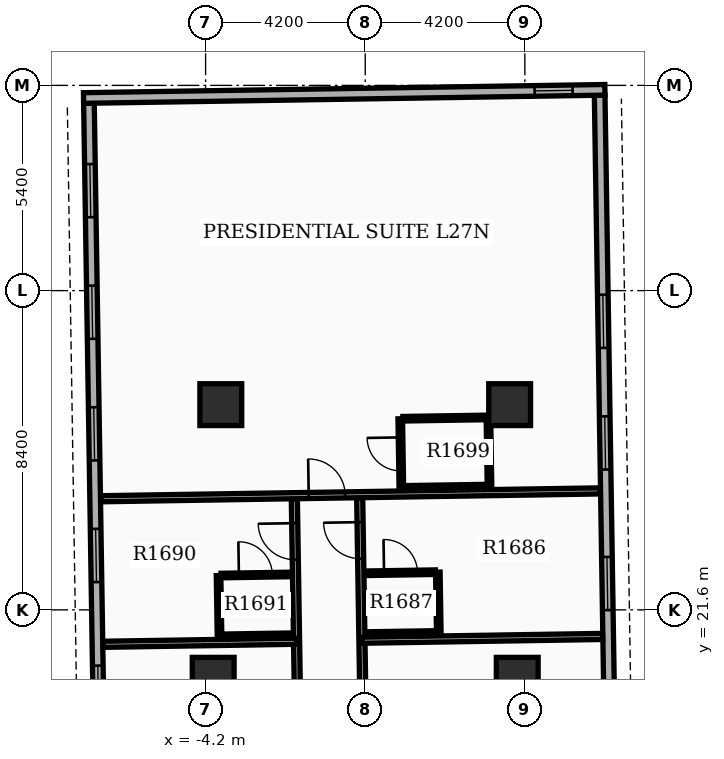
"""IFC4 building model, lengths in metres.
Left out: names, types, materials, properties, quantities, classifications, styles, units other than length and angle.
Written with IfcOpenShell. Run it as: python <this file> out.ifc"""

import sys

from ifc_helpers import new_model, si_unit, direction, frame, frame_2d, origin, origin_2d, place, context, subcontext, project, spatial, rectangle, extrude, element, fill, save


model = new_model("IFC4")
c1 = context("Model", 3, precision=1e-05, world=origin(), true_north=direction((0.0, 1.0)))
c2 = subcontext(c1, "Body", "Model", "MODEL_VIEW")
j1 = project(units=[si_unit("LENGTHUNIT", "METRE"), si_unit("PLANEANGLEUNIT", "RADIAN")], contexts=[c1])
p1 = place(None, origin())
s1 = spatial("IfcSite", under=j1, at=p1, CompositionType="ELEMENT")
p2 = place(p1, origin())
s2 = spatial("IfcBuilding", under=s1, at=p2, CompositionType="ELEMENT")
p3 = place(p2, frame((0.0, 0.0, 108.6)))
s3 = spatial("IfcBuildingStorey", under=s2, at=p3, CompositionType="ELEMENT", Elevation=108.6)
for number, where, z_axis, x_axis in (
    (1, (-4.0, 19.8, 0.0), (0.0, 0.0, 1.0), (1.0, 0.0, 0.0)),
    (2, (4.0, 19.8, 0.0), (0.0, 0.0, 1.0), (1.0, 0.0, 0.0)),
    (3, (-3.8, 27.0, 0.0), (0.0, 0.0, 1.0), (1.0, 0.0, 0.0)),
    (4, (3.8, 27.0, 0.0), (0.0, 0.0, 1.0), (1.0, 0.0, 0.0)),
):
    element("IfcColumn", number, at=place(p3, frame(where, z_axis=z_axis, x_axis=x_axis)), inside=s3, PredefinedType="COLUMN", context=c2, shape_type="SweptSolid", body=[
        extrude(rectangle(XDim=1.1, YDim=1.1, at=origin_2d()), origin(), (0.0, 0.0, 1.0), 3.9),
    ])
p4 = place(p3, frame((6.485, 15.044, 0.0), z_axis=(0.0, 0.0, 1.0), x_axis=(-0.01571739401, 0.999876474133, 0.0)))
e5 = element("IfcWall", 5, at=p4, inside=s3, PredefinedType="STANDARD", context=c2, shape_type="SweptSolid", body=[
    extrude(rectangle(XDim=20.1, YDim=0.28, at=frame_2d((10.05, 0.0))), origin(), (0.0, 0.0, 1.0), 2.97),
])
p5 = place(p4, frame((1.6, 0.0, 0.8)))
e6 = element("IfcOpeningElement", 6, at=p5, cuts=e5, PredefinedType="OPENING", context=c2, shape_type="SweptSolid", body=[
    extrude(rectangle(XDim=1.4, YDim=1.6, at=frame_2d((0.7, 0.8))), frame((0.0, 0.15, 0.0), z_axis=(0.0, -1.0, 0.0), x_axis=(1.0, 0.0, 0.0)), (0.0, 0.0, 1.0), 0.3),
])
p6 = place(p4, frame((6.55, 0.0, 0.8)))
e7 = element("IfcOpeningElement", 7, at=p6, cuts=e5, PredefinedType="OPENING", context=c2, shape_type="SweptSolid", body=[
    extrude(rectangle(XDim=1.4, YDim=1.6, at=frame_2d((0.7, 0.8))), frame((0.0, 0.15, 0.0), z_axis=(0.0, -1.0, 0.0), x_axis=(1.0, 0.0, 0.0)), (0.0, 0.0, 1.0), 0.3),
])
p7 = place(p4, frame((10.25, 0.0, 0.8)))
e8 = element("IfcOpeningElement", 8, at=p7, cuts=e5, PredefinedType="OPENING", context=c2, shape_type="SweptSolid", body=[
    extrude(rectangle(XDim=1.4, YDim=1.6, at=frame_2d((0.7, 0.8))), frame((0.0, 0.15, 0.0), z_axis=(0.0, -1.0, 0.0), x_axis=(1.0, 0.0, 0.0)), (0.0, 0.0, 1.0), 0.3),
])
p8 = place(p4, frame((13.45, 0.0, 0.8)))
e9 = element("IfcOpeningElement", 9, at=p8, cuts=e5, PredefinedType="OPENING", context=c2, shape_type="SweptSolid", body=[
    extrude(rectangle(XDim=1.4, YDim=1.6, at=frame_2d((0.7, 0.8))), frame((0.0, 0.15, 0.0), z_axis=(0.0, -1.0, 0.0), x_axis=(1.0, 0.0, 0.0)), (0.0, 0.0, 1.0), 0.3),
])
p9 = place(p3, frame((-7.27, 34.93, 0.0), z_axis=(0.0, 0.0, 1.0), x_axis=(0.015705059908, -0.999876667941, 0.0)))
e10 = element("IfcWall", 10, at=p9, inside=s3, PredefinedType="STANDARD", context=c2, shape_type="SweptSolid", body=[
    extrude(rectangle(XDim=20.1, YDim=0.28, at=frame_2d((10.05, 0.0))), origin(), (0.0, 0.0, 1.0), 2.97),
])
p10 = place(p9, frame((1.6, 0.0, 0.8)))
e11 = element("IfcOpeningElement", 11, at=p10, cuts=e10, PredefinedType="OPENING", context=c2, shape_type="SweptSolid", body=[
    extrude(rectangle(XDim=1.4, YDim=1.6, at=frame_2d((0.7, 0.8))), frame((0.0, 0.15, 0.0), z_axis=(0.0, -1.0, 0.0), x_axis=(1.0, 0.0, 0.0)), (0.0, 0.0, 1.0), 0.3),
])
p11 = place(p9, frame((4.8, 0.0, 0.8)))
e12 = element("IfcOpeningElement", 12, at=p11, cuts=e10, PredefinedType="OPENING", context=c2, shape_type="SweptSolid", body=[
    extrude(rectangle(XDim=1.4, YDim=1.6, at=frame_2d((0.7, 0.8))), frame((0.0, 0.15, 0.0), z_axis=(0.0, -1.0, 0.0), x_axis=(1.0, 0.0, 0.0)), (0.0, 0.0, 1.0), 0.3),
])
p12 = place(p9, frame((8.0, 0.0, 0.8)))
e13 = element("IfcOpeningElement", 13, at=p12, cuts=e10, PredefinedType="OPENING", context=c2, shape_type="SweptSolid", body=[
    extrude(rectangle(XDim=1.4, YDim=1.6, at=frame_2d((0.7, 0.8))), frame((0.0, 0.15, 0.0), z_axis=(0.0, -1.0, 0.0), x_axis=(1.0, 0.0, 0.0)), (0.0, 0.0, 1.0), 0.3),
])
p13 = place(p9, frame((11.2, 0.0, 0.8)))
e14 = element("IfcOpeningElement", 14, at=p13, cuts=e10, PredefinedType="OPENING", context=c2, shape_type="SweptSolid", body=[
    extrude(rectangle(XDim=1.4, YDim=1.6, at=frame_2d((0.7, 0.8))), frame((0.0, 0.15, 0.0), z_axis=(0.0, -1.0, 0.0), x_axis=(1.0, 0.0, 0.0)), (0.0, 0.0, 1.0), 0.3),
])
p14 = place(p9, frame((14.799, 0.0, 0.85)))
e15 = element("IfcOpeningElement", 15, at=p14, cuts=e10, PredefinedType="OPENING", context=c2, shape_type="SweptSolid", body=[
    extrude(rectangle(XDim=1.2, YDim=1.6, at=frame_2d((0.6, 0.8))), frame((0.0, 0.15, 0.0), z_axis=(0.0, -1.0, 0.0), x_axis=(1.0, 0.0, 0.0)), (0.0, 0.0, 1.0), 0.3),
])
p15 = place(p3, frame((6.307, 35.283, 0.0), z_axis=(0.0, 0.0, 1.0), x_axis=(-0.999876549481, -0.015712599986, 0.0)))
e16 = element("IfcWall", 16, at=p15, inside=s3, PredefinedType="STANDARD", context=c2, shape_type="SweptSolid", body=[
    extrude(rectangle(XDim=13.72, YDim=0.28, at=frame_2d((6.86, 0.0))), origin(), (0.0, 0.0, 1.0), 2.97),
])
p16 = place(p15, frame((0.85, 0.0, 0.85)))
e17 = element("IfcOpeningElement", 17, at=p16, cuts=e16, PredefinedType="OPENING", context=c2, shape_type="SweptSolid", body=[
    extrude(rectangle(XDim=1.0, YDim=1.5, at=frame_2d((0.5, 0.75))), frame((0.0, 0.15, 0.0), z_axis=(0.0, -1.0, 0.0), x_axis=(1.0, 0.0, 0.0)), (0.0, 0.0, 1.0), 0.3),
])
p17 = place(p3, frame((0.007, 14.852, 0.0), z_axis=(0.0, 0.0, 1.0), x_axis=(-0.015680101899, 0.999877059645, 0.0)))
e18 = element("IfcWall", 18, at=p17, inside=s3, PredefinedType="PARTITIONING", context=c2, shape_type="SweptSolid", body=[
    extrude(rectangle(XDim=9.7, YDim=0.16, at=frame_2d((4.85, 0.0))), origin(), (0.0, 0.0, 1.0), 2.96),
])
p18 = place(p17, frame((2.575, 0.0, 0.0)))
e19 = element("IfcOpeningElement", 19, at=p18, cuts=e18, PredefinedType="OPENING", context=c2, shape_type="SweptSolid", body=[
    extrude(rectangle(XDim=0.96, YDim=2.15, at=frame_2d((0.48, 1.075))), frame((0.0, 0.09, 0.0), z_axis=(0.0, -1.0, 0.0), x_axis=(1.0, 0.0, 0.0)), (0.0, 0.0, 1.0), 0.18),
])
p19 = place(p17, frame((8.097, 0.0, 0.0)))
e20 = element("IfcOpeningElement", 20, at=p19, cuts=e18, PredefinedType="OPENING", context=c2, shape_type="SweptSolid", body=[
    extrude(rectangle(XDim=0.96, YDim=2.15, at=frame_2d((0.48, 1.075))), frame((0.0, 0.09, 0.0), z_axis=(0.0, -1.0, 0.0), x_axis=(1.0, 0.0, 0.0)), (0.0, 0.0, 1.0), 0.18),
])
p20 = place(p3, frame((-0.087, 20.801, 0.0), z_axis=(0.0, 0.0, 1.0), x_axis=(0.999876857896, 0.015692961637, 0.0)))
e21 = element("IfcWall", 21, at=p20, inside=s3, PredefinedType="PARTITIONING", context=c2, shape_type="SweptSolid", body=[
    extrude(rectangle(XDim=6.332, YDim=0.16, at=frame_2d((3.166, 0.0))), origin(), (0.0, 0.0, 1.0), 2.96),
])
p21 = place(p3, frame((0.026, 22.563, 0.0), z_axis=(0.0, 0.0, 1.0), x_axis=(0.999876836305, 0.015694337248, 0.0)))
e22 = element("IfcWall", 22, at=p21, inside=s3, PredefinedType="PARTITIONING", context=c2, shape_type="SweptSolid", body=[
    extrude(rectangle(XDim=1.82, YDim=0.12, at=frame_2d((0.91, 0.0))), origin(), (0.0, 0.0, 1.0), 2.96),
])
p22 = place(p21, frame((0.47, 0.0, 0.0)))
e23 = element("IfcOpeningElement", 23, at=p22, cuts=e22, PredefinedType="OPENING", context=c2, shape_type="SweptSolid", body=[
    extrude(rectangle(XDim=0.88, YDim=2.1, at=frame_2d((0.44, 1.05))), frame((0.0, 0.07, 0.0), z_axis=(0.0, -1.0, 0.0), x_axis=(1.0, 0.0, 0.0)), (0.0, 0.0, 1.0), 0.14),
])
p23 = place(p3, frame((0.051, 20.963, 0.0), z_axis=(0.0, 0.0, 1.0), x_axis=(0.999876836305, 0.015694337248, 0.0)))
e24 = element("IfcWall", 24, at=p23, inside=s3, PredefinedType="PARTITIONING", context=c2, shape_type="SweptSolid", body=[
    extrude(rectangle(XDim=1.82, YDim=0.12, at=frame_2d((0.91, 0.0))), origin(), (0.0, 0.0, 1.0), 2.96),
])
p24 = place(p3, frame((1.936, 20.993, 0.0), z_axis=(0.0, 0.0, 1.0), x_axis=(-0.015716050513, 0.999876495251, 0.0)))
e25 = element("IfcWall", 25, at=p24, inside=s3, PredefinedType="PARTITIONING", context=c2, shape_type="SweptSolid", body=[
    extrude(rectangle(XDim=1.6, YDim=0.12, at=frame_2d((0.8, 0.0))), origin(), (0.0, 0.0, 1.0), 2.96),
])
p25 = place(p3, frame((-1.713, 14.825, 0.0), z_axis=(0.0, 0.0, 1.0), x_axis=(-0.015705659641, 0.999876658521, 0.0)))
e26 = element("IfcWall", 26, at=p25, inside=s3, PredefinedType="PARTITIONING", context=c2, shape_type="SweptSolid", body=[
    extrude(rectangle(XDim=9.7, YDim=0.16, at=frame_2d((4.85, 0.0))), origin(), (0.0, 0.0, 1.0), 2.96),
])
p26 = place(p25, frame((2.575, 0.0, 0.0)))
e27 = element("IfcOpeningElement", 27, at=p26, cuts=e26, PredefinedType="OPENING", context=c2, shape_type="SweptSolid", body=[
    extrude(rectangle(XDim=0.96, YDim=2.15, at=frame_2d((0.48, 1.075))), frame((0.0, 0.09, 0.0), z_axis=(0.0, -1.0, 0.0), x_axis=(1.0, 0.0, 0.0)), (0.0, 0.0, 1.0), 0.18),
])
p27 = place(p25, frame((8.097, 0.0, 0.0)))
e28 = element("IfcOpeningElement", 28, at=p27, cuts=e26, PredefinedType="OPENING", context=c2, shape_type="SweptSolid", body=[
    extrude(rectangle(XDim=0.96, YDim=2.15, at=frame_2d((0.48, 1.075))), frame((0.0, 0.09, 0.0), z_axis=(0.0, -1.0, 0.0), x_axis=(1.0, 0.0, 0.0)), (0.0, 0.0, 1.0), 0.18),
])
p28 = place(p3, frame((-1.806, 20.774, 0.0), z_axis=(0.0, 0.0, 1.0), x_axis=(-0.999876343559, -0.015725698427, 0.0)))
e29 = element("IfcWall", 29, at=p28, inside=s3, PredefinedType="PARTITIONING", context=c2, shape_type="SweptSolid", body=[
    extrude(rectangle(XDim=5.092, YDim=0.16, at=frame_2d((2.546, 0.0))), origin(), (0.0, 0.0, 1.0), 2.96),
])
p29 = place(p3, frame((-3.794, 22.503, 0.0), z_axis=(0.0, 0.0, 1.0), x_axis=(0.999876836305, 0.015694337248, 0.0)))
e30 = element("IfcWall", 30, at=p29, inside=s3, PredefinedType="PARTITIONING", context=c2, shape_type="SweptSolid", body=[
    extrude(rectangle(XDim=1.82, YDim=0.12, at=frame_2d((0.91, 0.0))), origin(), (0.0, 0.0, 1.0), 2.96),
])
p30 = place(p29, frame((0.47, 0.0, 0.0)))
e31 = element("IfcOpeningElement", 31, at=p30, cuts=e30, PredefinedType="OPENING", context=c2, shape_type="SweptSolid", body=[
    extrude(rectangle(XDim=0.88, YDim=2.1, at=frame_2d((0.44, 1.05))), frame((0.0, 0.07, 0.0), z_axis=(0.0, -1.0, 0.0), x_axis=(1.0, 0.0, 0.0)), (0.0, 0.0, 1.0), 0.14),
])
p31 = place(p3, frame((-3.769, 20.903, 0.0), z_axis=(0.0, 0.0, 1.0), x_axis=(0.999876836305, 0.015694337248, 0.0)))
e32 = element("IfcWall", 32, at=p31, inside=s3, PredefinedType="PARTITIONING", context=c2, shape_type="SweptSolid", body=[
    extrude(rectangle(XDim=1.82, YDim=0.12, at=frame_2d((0.91, 0.0))), origin(), (0.0, 0.0, 1.0), 2.96),
])
p32 = place(p3, frame((-3.834, 20.902, 0.0), z_axis=(0.0, 0.0, 1.0), x_axis=(-0.015716050513, 0.999876495251, 0.0)))
e33 = element("IfcWall", 33, at=p32, inside=s3, PredefinedType="PARTITIONING", context=c2, shape_type="SweptSolid", body=[
    extrude(rectangle(XDim=1.6, YDim=0.12, at=frame_2d((0.8, 0.0))), origin(), (0.0, 0.0, 1.0), 2.96),
])
p33 = place(p3, frame((-6.958, 24.524, 0.0), z_axis=(0.0, 0.0, 1.0), x_axis=(0.999876528878, 0.015713911007, 0.0)))
e34 = element("IfcWall", 34, at=p33, inside=s3, PredefinedType="PARTITIONING", context=c2, shape_type="SweptSolid", body=[
    extrude(rectangle(XDim=13.144, YDim=0.16, at=frame_2d((6.572, 0.0))), origin(), (0.0, 0.0, 1.0), 2.96),
])
p34 = place(p33, frame((5.472, 0.0, 0.0)))
e35 = element("IfcOpeningElement", 35, at=p34, cuts=e34, PredefinedType="OPENING", context=c2, shape_type="SweptSolid", body=[
    extrude(rectangle(XDim=0.96, YDim=2.15, at=frame_2d((0.48, 1.075))), frame((0.0, 0.09, 0.0), z_axis=(0.0, -1.0, 0.0), x_axis=(1.0, 0.0, 0.0)), (0.0, 0.0, 1.0), 0.18),
])
p35 = place(p3, frame((0.95, 24.808, 0.0), z_axis=(0.0, 0.0, 1.0), x_axis=(-0.015696442504, 0.999876803258, 0.0)))
e36 = element("IfcWall", 36, at=p35, inside=s3, PredefinedType="PARTITIONING", context=c2, shape_type="SweptSolid", body=[
    extrude(rectangle(XDim=1.82, YDim=0.12, at=frame_2d((0.91, 0.0))), origin(), (0.0, 0.0, 1.0), 2.96),
])
p36 = place(p35, frame((0.45, 0.0, 0.0)))
e37 = element("IfcOpeningElement", 37, at=p36, cuts=e36, PredefinedType="OPENING", context=c2, shape_type="SweptSolid", body=[
    extrude(rectangle(XDim=0.88, YDim=2.1, at=frame_2d((0.44, 1.05))), frame((0.0, 0.07, 0.0), z_axis=(0.0, -1.0, 0.0), x_axis=(1.0, 0.0, 0.0)), (0.0, 0.0, 1.0), 0.14),
])
p37 = place(p3, frame((3.27, 24.844, 0.0), z_axis=(0.0, 0.0, 1.0), x_axis=(-0.015694337248, 0.999876836305, 0.0)))
e38 = element("IfcWall", 38, at=p37, inside=s3, PredefinedType="PARTITIONING", context=c2, shape_type="SweptSolid", body=[
    extrude(rectangle(XDim=1.82, YDim=0.12, at=frame_2d((0.91, 0.0))), origin(), (0.0, 0.0, 1.0), 2.96),
])
for number, where, z_axis, x_axis in (
    (39, (1.021, 24.809, 0.0), (0.0, 0.0, 1.0), (1.0, 0.016, 0.0)),
    (40, (0.992, 26.629, 0.0), (0.0, 0.0, 1.0), (1.0, 0.016, 0.0)),
):
    element("IfcWall", number, at=place(p3, frame(where, z_axis=z_axis, x_axis=x_axis)), inside=s3, PredefinedType="PARTITIONING", context=c2, shape_type="SweptSolid", body=[
        extrude(rectangle(XDim=2.18, YDim=0.12, at=frame_2d((1.09, 0.0))), origin(), (0.0, 0.0, 1.0), 2.96),
    ])
p38 = place(p6, origin())
e41 = element("IfcWindow", 41, at=p38, inside=s3, PartitioningType="SINGLE_PANEL", PredefinedType="WINDOW", context=c2, shape_type="SweptSolid", body=[
    extrude(rectangle(XDim=1.4, YDim=1.6, at=frame_2d((0.7, 0.8))), frame((0.0, 0.03, 0.0), z_axis=(0.0, -1.0, 0.0), x_axis=(1.0, 0.0, 0.0)), (0.0, 0.0, 1.0), 0.06),
])
fill(e7, e41)
p39 = place(p7, origin())
e42 = element("IfcWindow", 42, at=p39, inside=s3, PartitioningType="SINGLE_PANEL", PredefinedType="WINDOW", context=c2, shape_type="SweptSolid", body=[
    extrude(rectangle(XDim=1.4, YDim=1.6, at=frame_2d((0.7, 0.8))), frame((0.0, 0.03, 0.0), z_axis=(0.0, -1.0, 0.0), x_axis=(1.0, 0.0, 0.0)), (0.0, 0.0, 1.0), 0.06),
])
fill(e8, e42)
p40 = place(p8, origin())
e43 = element("IfcWindow", 43, at=p40, inside=s3, PartitioningType="SINGLE_PANEL", PredefinedType="WINDOW", context=c2, shape_type="SweptSolid", body=[
    extrude(rectangle(XDim=1.4, YDim=1.6, at=frame_2d((0.7, 0.8))), frame((0.0, 0.03, 0.0), z_axis=(0.0, -1.0, 0.0), x_axis=(1.0, 0.0, 0.0)), (0.0, 0.0, 1.0), 0.06),
])
fill(e9, e43)
p41 = place(p10, origin())
e44 = element("IfcWindow", 44, at=p41, inside=s3, PartitioningType="SINGLE_PANEL", PredefinedType="WINDOW", context=c2, shape_type="SweptSolid", body=[
    extrude(rectangle(XDim=1.4, YDim=1.6, at=frame_2d((0.7, 0.8))), frame((0.0, 0.03, 0.0), z_axis=(0.0, -1.0, 0.0), x_axis=(1.0, 0.0, 0.0)), (0.0, 0.0, 1.0), 0.06),
])
fill(e11, e44)
p42 = place(p11, origin())
e45 = element("IfcWindow", 45, at=p42, inside=s3, PartitioningType="SINGLE_PANEL", PredefinedType="WINDOW", context=c2, shape_type="SweptSolid", body=[
    extrude(rectangle(XDim=1.4, YDim=1.6, at=frame_2d((0.7, 0.8))), frame((0.0, 0.03, 0.0), z_axis=(0.0, -1.0, 0.0), x_axis=(1.0, 0.0, 0.0)), (0.0, 0.0, 1.0), 0.06),
])
fill(e12, e45)
p43 = place(p12, origin())
e46 = element("IfcWindow", 46, at=p43, inside=s3, PartitioningType="SINGLE_PANEL", PredefinedType="WINDOW", context=c2, shape_type="SweptSolid", body=[
    extrude(rectangle(XDim=1.4, YDim=1.6, at=frame_2d((0.7, 0.8))), frame((0.0, 0.03, 0.0), z_axis=(0.0, -1.0, 0.0), x_axis=(1.0, 0.0, 0.0)), (0.0, 0.0, 1.0), 0.06),
])
fill(e13, e46)
p44 = place(p13, origin())
e47 = element("IfcWindow", 47, at=p44, inside=s3, PartitioningType="SINGLE_PANEL", PredefinedType="WINDOW", context=c2, shape_type="SweptSolid", body=[
    extrude(rectangle(XDim=1.4, YDim=1.6, at=frame_2d((0.7, 0.8))), frame((0.0, 0.03, 0.0), z_axis=(0.0, -1.0, 0.0), x_axis=(1.0, 0.0, 0.0)), (0.0, 0.0, 1.0), 0.06),
])
fill(e14, e47)
p45 = place(p16, origin())
e48 = element("IfcWindow", 48, at=p45, inside=s3, PartitioningType="SINGLE_PANEL", PredefinedType="WINDOW", context=c2, shape_type="SweptSolid", body=[
    extrude(rectangle(XDim=1.0, YDim=1.5, at=frame_2d((0.5, 0.75))), frame((0.0, 0.03, 0.0), z_axis=(0.0, -1.0, 0.0), x_axis=(1.0, 0.0, 0.0)), (0.0, 0.0, 1.0), 0.06),
])
fill(e17, e48)
p46 = place(p14, origin())
e49 = element("IfcWindow", 49, at=p46, inside=s3, PartitioningType="SINGLE_PANEL", PredefinedType="WINDOW", context=c2, shape_type="SweptSolid", body=[
    extrude(rectangle(XDim=1.2, YDim=1.6, at=frame_2d((0.6, 0.8))), frame((0.0, 0.03, 0.0), z_axis=(0.0, -1.0, 0.0), x_axis=(1.0, 0.0, 0.0)), (0.0, 0.0, 1.0), 0.06),
])
fill(e15, e49)
p47 = place(p19, origin())
e50 = element("IfcDoor", 50, at=p47, inside=s3, OperationType="SINGLE_SWING_RIGHT", PredefinedType="DOOR", context=c2, shape_type="SweptSolid", body=[
    extrude(rectangle(XDim=0.96, YDim=2.15, at=frame_2d((0.48, 1.075))), frame((0.0, 0.025, 0.0), z_axis=(0.0, -1.0, 0.0), x_axis=(1.0, 0.0, 0.0)), (0.0, 0.0, 1.0), 0.05),
])
fill(e20, e50)
p48 = place(p22, origin())
e51 = element("IfcDoor", 51, at=p48, inside=s3, OperationType="SINGLE_SWING_LEFT", PredefinedType="DOOR", context=c2, shape_type="SweptSolid", body=[
    extrude(rectangle(XDim=0.88, YDim=2.1, at=frame_2d((0.44, 1.05))), frame((0.0, 0.025, 0.0), z_axis=(0.0, -1.0, 0.0), x_axis=(1.0, 0.0, 0.0)), (0.0, 0.0, 1.0), 0.05),
])
fill(e23, e51)
p49 = place(p27, origin())
e52 = element("IfcDoor", 52, at=p49, inside=s3, OperationType="SINGLE_SWING_RIGHT", PredefinedType="DOOR", context=c2, shape_type="SweptSolid", body=[
    extrude(rectangle(XDim=0.96, YDim=2.15, at=frame_2d((0.48, 1.075))), frame((0.0, 0.025, 0.0), z_axis=(0.0, -1.0, 0.0), x_axis=(1.0, 0.0, 0.0)), (0.0, 0.0, 1.0), 0.05),
])
fill(e28, e52)
p50 = place(p30, origin())
e53 = element("IfcDoor", 53, at=p50, inside=s3, OperationType="SINGLE_SWING_LEFT", PredefinedType="DOOR", context=c2, shape_type="SweptSolid", body=[
    extrude(rectangle(XDim=0.88, YDim=2.1, at=frame_2d((0.44, 1.05))), frame((0.0, 0.025, 0.0), z_axis=(0.0, -1.0, 0.0), x_axis=(1.0, 0.0, 0.0)), (0.0, 0.0, 1.0), 0.05),
])
fill(e31, e53)
p51 = place(p34, origin())
e54 = element("IfcDoor", 54, at=p51, inside=s3, OperationType="SINGLE_SWING_LEFT", PredefinedType="DOOR", context=c2, shape_type="SweptSolid", body=[
    extrude(rectangle(XDim=0.96, YDim=2.15, at=frame_2d((0.48, 1.075))), frame((0.0, 0.025, 0.0), z_axis=(0.0, -1.0, 0.0), x_axis=(1.0, 0.0, 0.0)), (0.0, 0.0, 1.0), 0.05),
])
fill(e35, e54)
p52 = place(p36, origin())
e55 = element("IfcDoor", 55, at=p52, inside=s3, OperationType="SINGLE_SWING_RIGHT", PredefinedType="DOOR", context=c2, shape_type="SweptSolid", body=[
    extrude(rectangle(XDim=0.88, YDim=2.1, at=frame_2d((0.44, 1.05))), frame((0.0, 0.025, 0.0), z_axis=(0.0, -1.0, 0.0), x_axis=(1.0, 0.0, 0.0)), (0.0, 0.0, 1.0), 0.05),
])
fill(e37, e55)
save(model, sys.argv[1])
